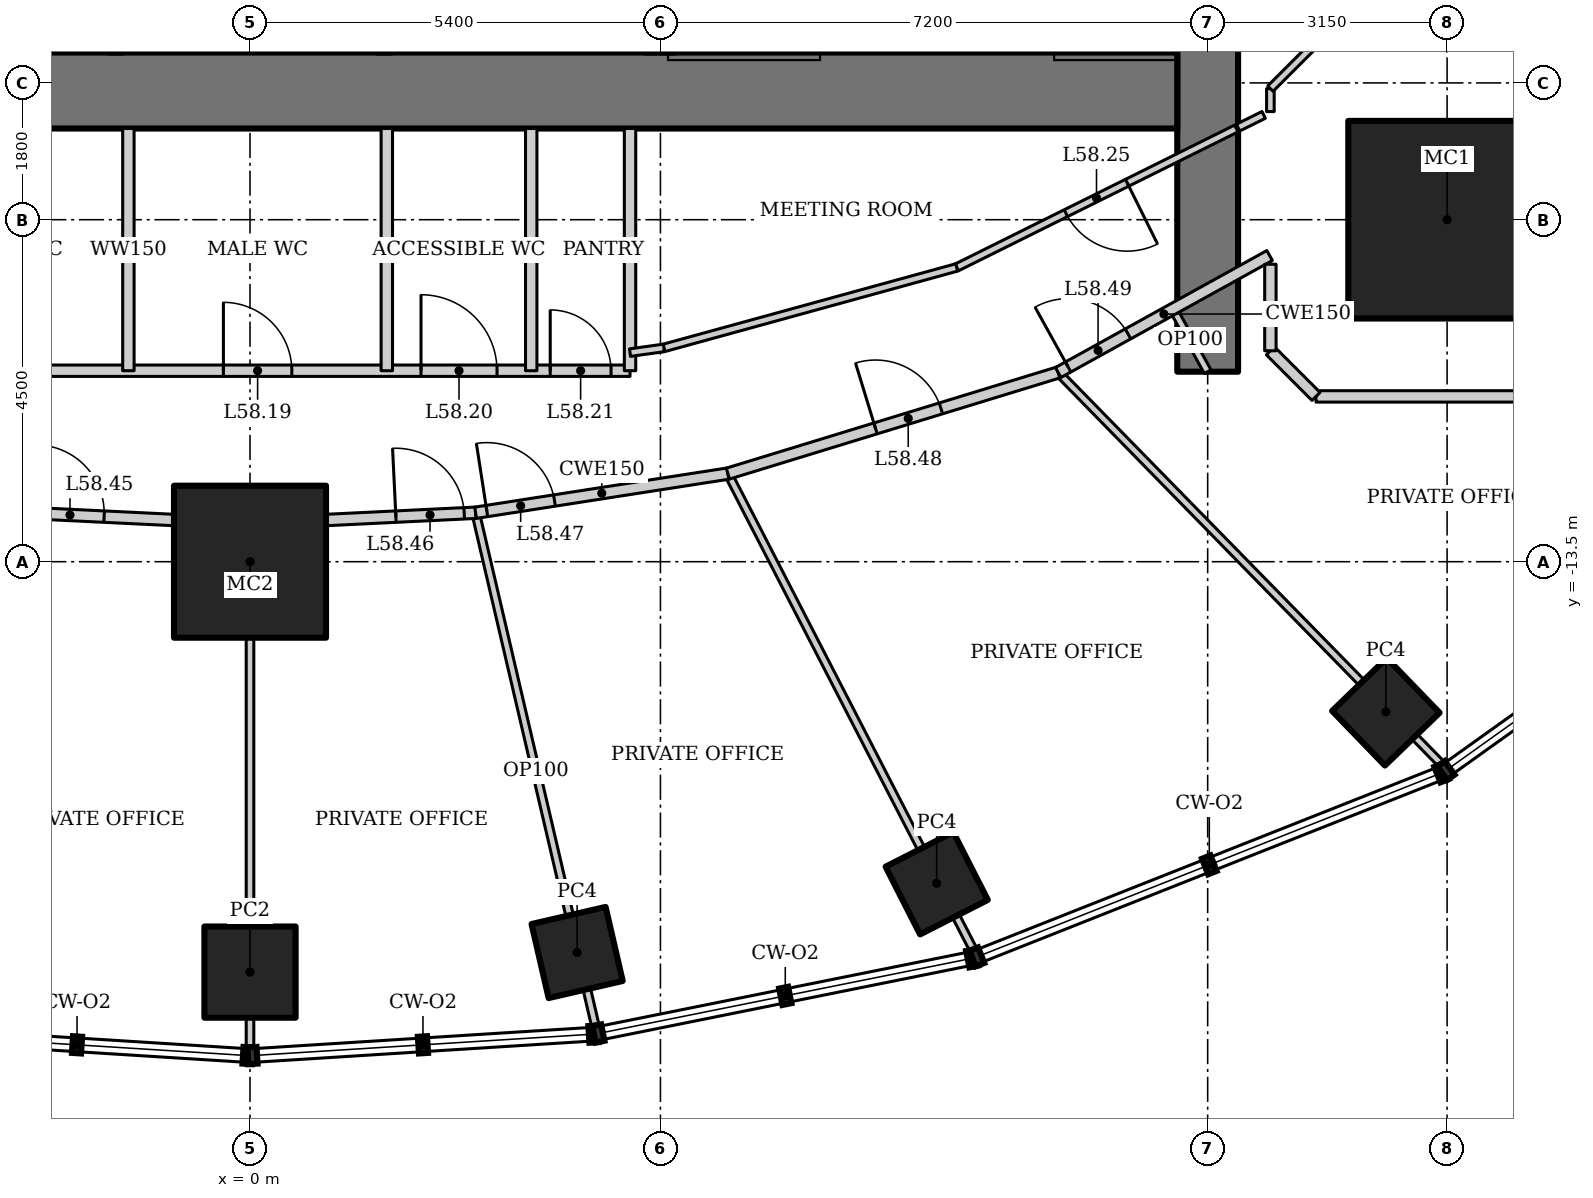
"""IFC4 building model, lengths in metres.
Left out: names, types, materials, properties, quantities, classifications, styles, units other than length and angle.
Written with IfcOpenShell. Run it as: python <this file> out.ifc"""

import sys

from ifc_helpers import new_model, si_unit, direction, frame, frame_2d, origin, origin_2d, place, context, subcontext, project, spatial, rectangle, hollow_rectangle, extrude, element, fill, save


model = new_model("IFC4")
c1 = context("Model", 3, precision=1e-05, world=origin(), true_north=direction((0.0, 1.0)))
c2 = subcontext(c1, "Body", "Model", "MODEL_VIEW")
j1 = project(units=[si_unit("LENGTHUNIT", "METRE"), si_unit("PLANEANGLEUNIT", "RADIAN")], contexts=[c1])
p1 = place(None, origin())
s1 = spatial("IfcSite", under=j1, at=p1, CompositionType="ELEMENT")
p2 = place(p1, origin())
s2 = spatial("IfcBuilding", under=s1, at=p2, CompositionType="ELEMENT")
p3 = place(p2, frame((0.0, 0.0, 249.4)))
s3 = spatial("IfcBuildingStorey", under=s2, at=p3, CompositionType="ELEMENT", Elevation=249.4)
p4 = place(p3, frame((0.0, -13.5, 0.0), z_axis=(0.0, 0.0, 1.0), x_axis=(1.0, 0.0, 0.0)))
e1 = element("IfcColumn", 1, at=p4, inside=s3, PredefinedType="COLUMN", context=c2, shape_type="SweptSolid", body=[
    extrude(hollow_rectangle(XDim=2.0, YDim=2.0, WallThickness=0.17, at=origin_2d()), origin(), (0.0, 0.0, 1.0), 4.2),
])
p5 = place(p3, frame((15.75, -9.0, 0.0), z_axis=(0.0, 0.0, 1.0), x_axis=(1.0, 0.0, 0.0)))
e2 = element("IfcColumn", 2, at=p5, inside=s3, PredefinedType="COLUMN", context=c2, shape_type="SweptSolid", body=[
    extrude(hollow_rectangle(XDim=2.6, YDim=2.6, WallThickness=0.13, at=origin_2d()), origin(), (0.0, 0.0, 1.0), 4.2),
])
p6 = place(p3, frame((0.0, -18.9, 0.0), z_axis=(0.0, 0.0, 1.0), x_axis=(1.0, 0.0, 0.0)))
e3 = element("IfcColumn", 3, at=p6, inside=s3, PredefinedType="COLUMN", context=c2, shape_type="SweptSolid", body=[
    extrude(hollow_rectangle(XDim=1.2, YDim=1.2, WallThickness=0.1, at=origin_2d()), origin(), (0.0, 0.0, 1.0), 4.2),
])
for number, where, z_axis, x_axis in (
    (4, (4.304, -18.642, 0.0), (0.0, 0.0, 1.0), (0.974, 0.225, 0.0)),
    (5, (9.035, -17.731, 0.0), (0.0, 0.0, 1.0), (0.891, 0.454, 0.0)),
    (6, (14.944, -15.475, 0.0), (0.0, 0.0, 1.0), (0.719, 0.695, 0.0)),
):
    element("IfcColumn", number, at=place(p3, frame(where, z_axis=z_axis, x_axis=x_axis)), inside=s3, PredefinedType="COLUMN", context=c2, shape_type="SweptSolid", body=[
        extrude(hollow_rectangle(XDim=1.0, YDim=1.0, WallThickness=0.08, at=origin_2d()), origin(), (0.0, 0.0, 1.0), 4.2),
    ])
p7 = place(p3, frame((12.6, -11.0, 0.0), z_axis=(0.0, 0.0, 1.0), x_axis=(0.0, 1.0, 0.0)))
e7 = element("IfcWall", 7, at=p7, inside=s3, PredefinedType="SHEAR", context=c2, shape_type="SweptSolid", body=[
    extrude(rectangle(XDim=22.0, YDim=0.8, at=frame_2d((11.0, 0.0))), origin(), (0.0, 0.0, 1.0), 4.2),
])
p8 = place(p7, frame((10.1, 0.0, 0.0)))
e8 = element("IfcOpeningElement", 8, at=p8, cuts=e7, PredefinedType="OPENING", context=c2, shape_type="SweptSolid", body=[
    extrude(rectangle(XDim=1.8, YDim=2.1, at=frame_2d((0.9, 1.05))), frame((0.0, 0.41, 0.0), z_axis=(0.0, -1.0, 0.0), x_axis=(1.0, 0.0, 0.0)), (0.0, 0.0, 1.0), 0.82),
])
p9 = place(p3, frame((-12.2, -7.3, 0.0), z_axis=(0.0, 0.0, 1.0), x_axis=(1.0, 0.0, 0.0)))
e9 = element("IfcWall", 9, at=p9, inside=s3, PredefinedType="SHEAR", context=c2, shape_type="SweptSolid", body=[
    extrude(rectangle(XDim=24.4, YDim=1.0, at=frame_2d((12.2, 0.0))), origin(), (0.0, 0.0, 1.0), 4.2),
])
for number, where, z_axis, x_axis in (
    (10, (-1.767, -2.6, 0.0), (0.0, 0.0, 1.0), (0.0, -1.0, 0.0)),
    (11, (1.767, -2.6, 0.0), (0.0, 0.0, 1.0), (0.0, -1.0, 0.0)),
):
    element("IfcWall", number, at=place(p3, frame(where, z_axis=z_axis, x_axis=x_axis)), inside=s3, PredefinedType="SOLIDWALL", context=c2, shape_type="SweptSolid", body=[
        extrude(rectangle(XDim=4.2, YDim=0.2, at=frame_2d((2.1, 0.0))), origin(), (0.0, 0.0, 1.0), 4.2),
    ])
p10 = place(p3, frame((0.0, -19.945, 0.0), z_axis=(0.0, 0.0, 1.0), x_axis=(0.0, 1.0, 0.0)))
e12 = element("IfcWall", 12, at=p10, inside=s3, PredefinedType="PARTITIONING", context=c2, shape_type="SweptSolid", body=[
    extrude(rectangle(XDim=6.945, YDim=0.1, at=frame_2d((3.472, 0.0))), origin(), (0.0, 0.0, 1.0), 3.644),
])
p11 = place(p3, frame((4.556, -19.657, 0.0), z_axis=(0.0, 0.0, 1.0), x_axis=(-0.22733791689, 0.973815933092, 0.0)))
e13 = element("IfcWall", 13, at=p11, inside=s3, PredefinedType="PARTITIONING", context=c2, shape_type="SweptSolid", body=[
    extrude(rectangle(XDim=6.984, YDim=0.1, at=frame_2d((3.492, 0.0))), origin(), (0.0, 0.0, 1.0), 3.293),
])
p12 = place(p3, frame((9.54, -18.65, 0.0), z_axis=(0.0, 0.0, 1.0), x_axis=(-0.45810402165, 0.88889859115, 0.0)))
e14 = element("IfcWall", 14, at=p12, inside=s3, PredefinedType="PARTITIONING", context=c2, shape_type="SweptSolid", body=[
    extrude(rectangle(XDim=7.098, YDim=0.1, at=frame_2d((3.549, 0.0))), origin(), (0.0, 0.0, 1.0), 3.293),
])
p13 = place(p3, frame((15.709, -16.199, 0.0), z_axis=(0.0, 0.0, 1.0), x_axis=(-0.699362525935, 0.714767135029, 0.0)))
e15 = element("IfcWall", 15, at=p13, inside=s3, PredefinedType="PARTITIONING", context=c2, shape_type="SweptSolid", body=[
    extrude(rectangle(XDim=7.259, YDim=0.1, at=frame_2d((3.629, 0.0))), origin(), (0.0, 0.0, 1.0), 3.41),
])
p14 = place(p3, frame((-2.968, -12.856, 0.0), z_axis=(0.0, 0.0, 1.0), x_axis=(0.998824412818, -0.04847465687, 0.0)))
e16 = element("IfcWall", 16, at=p14, inside=s3, PredefinedType="PARTITIONING", context=c2, shape_type="SweptSolid", body=[
    extrude(rectangle(XDim=2.971, YDim=0.15, at=frame_2d((1.486, 0.0))), origin(), (0.0, 0.0, 1.0), 4.05),
])
p15 = place(p14, frame((0.15, 0.0, 0.0)))
e17 = element("IfcOpeningElement", 17, at=p15, cuts=e16, PredefinedType="OPENING", context=c2, shape_type="SweptSolid", body=[
    extrude(rectangle(XDim=0.9, YDim=2.1, at=frame_2d((0.45, 1.05))), frame((0.0, 0.085, 0.0), z_axis=(0.0, -1.0, 0.0), x_axis=(1.0, 0.0, 0.0)), (0.0, 0.0, 1.0), 0.17),
])
p16 = place(p3, frame((0.0, -13.0, 0.0), z_axis=(0.0, 0.0, 1.0), x_axis=(0.998824412818, 0.04847465687, 0.0)))
e18 = element("IfcWall", 18, at=p16, inside=s3, PredefinedType="PARTITIONING", context=c2, shape_type="SweptSolid", body=[
    extrude(rectangle(XDim=2.971, YDim=0.15, at=frame_2d((1.486, 0.0))), origin(), (0.0, 0.0, 1.0), 4.05),
])
p17 = place(p16, frame((1.921, 0.0, 0.0)))
e19 = element("IfcOpeningElement", 19, at=p17, cuts=e18, PredefinedType="OPENING", context=c2, shape_type="SweptSolid", body=[
    extrude(rectangle(XDim=0.9, YDim=2.1, at=frame_2d((0.45, 1.05))), frame((0.0, 0.085, 0.0), z_axis=(0.0, -1.0, 0.0), x_axis=(1.0, 0.0, 0.0)), (0.0, 0.0, 1.0), 0.17),
])
p18 = place(p3, frame((2.968, -12.856, 0.0), z_axis=(0.0, 0.0, 1.0), x_axis=(0.988174283057, 0.153334882869, 0.0)))
e20 = element("IfcWall", 20, at=p18, inside=s3, PredefinedType="PARTITIONING", context=c2, shape_type="SweptSolid", body=[
    extrude(rectangle(XDim=3.36, YDim=0.15, at=frame_2d((1.68, 0.0))), origin(), (0.0, 0.0, 1.0), 4.05),
])
p19 = place(p18, frame((0.15, 0.0, 0.0)))
e21 = element("IfcOpeningElement", 21, at=p19, cuts=e20, PredefinedType="OPENING", context=c2, shape_type="SweptSolid", body=[
    extrude(rectangle(XDim=0.9, YDim=2.1, at=frame_2d((0.45, 1.05))), frame((0.0, 0.085, 0.0), z_axis=(0.0, -1.0, 0.0), x_axis=(1.0, 0.0, 0.0)), (0.0, 0.0, 1.0), 0.17),
])
p20 = place(p3, frame((6.288, -12.341, 0.0), z_axis=(0.0, 0.0, 1.0), x_axis=(0.956185837153, 0.292760388079, 0.0)))
e22 = element("IfcWall", 22, at=p20, inside=s3, PredefinedType="PARTITIONING", context=c2, shape_type="SweptSolid", body=[
    extrude(rectangle(XDim=4.544, YDim=0.15, at=frame_2d((2.272, 0.0))), origin(), (0.0, 0.0, 1.0), 4.05),
])
p21 = place(p20, frame((2.031, 0.0, 0.0)))
e23 = element("IfcOpeningElement", 23, at=p21, cuts=e22, PredefinedType="OPENING", context=c2, shape_type="SweptSolid", body=[
    extrude(rectangle(XDim=0.9, YDim=2.1, at=frame_2d((0.45, 1.05))), frame((0.0, 0.085, 0.0), z_axis=(0.0, -1.0, 0.0), x_axis=(1.0, 0.0, 0.0)), (0.0, 0.0, 1.0), 0.17),
])
p22 = place(p3, frame((-5.0, -10.987, 0.0), z_axis=(0.0, 0.0, 1.0), x_axis=(1.0, 0.0, 0.0)))
e24 = element("IfcWall", 24, at=p22, inside=s3, PredefinedType="SOLIDWALL", context=c2, shape_type="SweptSolid", body=[
    extrude(rectangle(XDim=10.0, YDim=0.15, at=frame_2d((5.0, 0.0))), origin(), (0.0, 0.0, 1.0), 4.05),
])
p23 = place(p22, frame((1.25, 0.0, 0.0)))
e25 = element("IfcOpeningElement", 25, at=p23, cuts=e24, PredefinedType="OPENING", context=c2, shape_type="SweptSolid", body=[
    extrude(rectangle(XDim=0.9, YDim=2.1, at=frame_2d((0.45, 1.05))), frame((0.0, 0.085, 0.0), z_axis=(0.0, -1.0, 0.0), x_axis=(1.0, 0.0, 0.0)), (0.0, 0.0, 1.0), 0.17),
])
p24 = place(p22, frame((4.65, 0.0, 0.0)))
e26 = element("IfcOpeningElement", 26, at=p24, cuts=e24, PredefinedType="OPENING", context=c2, shape_type="SweptSolid", body=[
    extrude(rectangle(XDim=0.9, YDim=2.1, at=frame_2d((0.45, 1.05))), frame((0.0, 0.085, 0.0), z_axis=(0.0, -1.0, 0.0), x_axis=(1.0, 0.0, 0.0)), (0.0, 0.0, 1.0), 0.17),
])
p25 = place(p22, frame((7.25, 0.0, 0.0)))
e27 = element("IfcOpeningElement", 27, at=p25, cuts=e24, PredefinedType="OPENING", context=c2, shape_type="SweptSolid", body=[
    extrude(rectangle(XDim=1.0, YDim=2.1, at=frame_2d((0.5, 1.05))), frame((0.0, 0.085, 0.0), z_axis=(0.0, -1.0, 0.0), x_axis=(1.0, 0.0, 0.0)), (0.0, 0.0, 1.0), 0.17),
])
p26 = place(p22, frame((8.95, 0.0, 0.0)))
e28 = element("IfcOpeningElement", 28, at=p26, cuts=e24, PredefinedType="OPENING", context=c2, shape_type="SweptSolid", body=[
    extrude(rectangle(XDim=0.8, YDim=2.1, at=frame_2d((0.4, 1.05))), frame((0.0, 0.085, 0.0), z_axis=(0.0, -1.0, 0.0), x_axis=(1.0, 0.0, 0.0)), (0.0, 0.0, 1.0), 0.17),
])
for number, where, z_axis, x_axis in (
    (29, (5.0, -7.8, 0.0), (0.0, 0.0, 1.0), (0.0, -1.0, 0.0)),
    (30, (-1.6, -7.8, 0.0), (0.0, 0.0, 1.0), (0.0, -1.0, 0.0)),
):
    element("IfcWall", number, at=place(p3, frame(where, z_axis=z_axis, x_axis=x_axis)), inside=s3, PredefinedType="SOLIDWALL", context=c2, shape_type="SweptSolid", body=[
        extrude(rectangle(XDim=3.187, YDim=0.15, at=frame_2d((1.594, 0.0))), origin(), (0.0, 0.0, 1.0), 4.05),
    ])
p27 = place(p3, frame((1.8, -7.8, 0.0), z_axis=(0.0, 0.0, 1.0), x_axis=(0.0, -1.0, 0.0)))
e31 = element("IfcWall", 31, at=p27, inside=s3, PredefinedType="SOLIDWALL", context=c2, shape_type="SweptSolid", body=[
    extrude(rectangle(XDim=3.187, YDim=0.15, at=frame_2d((1.594, 0.0))), origin(), (0.0, 0.0, 1.0), 3.293),
])
p28 = place(p3, frame((3.7, -7.8, 0.0), z_axis=(0.0, 0.0, 1.0), x_axis=(0.0, -1.0, 0.0)))
e32 = element("IfcWall", 32, at=p28, inside=s3, PredefinedType="SOLIDWALL", context=c2, shape_type="SweptSolid", body=[
    extrude(rectangle(XDim=3.187, YDim=0.15, at=frame_2d((1.594, 0.0))), origin(), (0.0, 0.0, 1.0), 4.05),
])
p29 = place(p3, frame((12.977, -7.8, 0.0), z_axis=(0.0, 0.0, 1.0), x_axis=(-0.895529831139, -0.445001484874, 0.0)))
e33 = element("IfcWall", 33, at=p29, inside=s3, PredefinedType="PARTITIONING", context=c2, shape_type="SweptSolid", body=[
    extrude(rectangle(XDim=4.108, YDim=0.1, at=frame_2d((2.054, 0.0))), origin(), (0.0, 0.0, 1.0), 4.05),
])
p30 = place(p29, frame((1.604, 0.0, 0.0)))
e34 = element("IfcOpeningElement", 34, at=p30, cuts=e33, PredefinedType="OPENING", context=c2, shape_type="SweptSolid", body=[
    extrude(rectangle(XDim=0.9, YDim=2.1, at=frame_2d((0.45, 1.05))), frame((0.0, 0.06, 0.0), z_axis=(0.0, -1.0, 0.0), x_axis=(1.0, 0.0, 0.0)), (0.0, 0.0, 1.0), 0.12),
])
p31 = place(p3, frame((9.298, -9.628, 0.0), z_axis=(0.0, 0.0, 1.0), x_axis=(-0.964244438722, -0.265014456954, 0.0)))
e35 = element("IfcWall", 35, at=p31, inside=s3, PredefinedType="PARTITIONING", context=c2, shape_type="SweptSolid", body=[
    extrude(rectangle(XDim=3.995, YDim=0.1, at=frame_2d((1.998, 0.0))), origin(), (0.0, 0.0, 1.0), 4.05),
])
p32 = place(p3, frame((5.445, -10.687, 0.0), z_axis=(0.0, 0.0, 1.0), x_axis=(-0.990442882696, -0.137923515463, 0.0)))
e36 = element("IfcWall", 36, at=p32, inside=s3, PredefinedType="PARTITIONING", context=c2, shape_type="SweptSolid", body=[
    extrude(rectangle(XDim=0.45, YDim=0.1, at=frame_2d((0.225, 0.0))), origin(), (0.0, 0.0, 1.0), 4.05),
])
p33 = place(p3, frame((13.337, -7.621, 0.0), z_axis=(0.0, 0.0, 1.0), x_axis=(-0.895721570004, -0.444615416995, 0.0)))
e37 = element("IfcWall", 37, at=p33, inside=s3, PredefinedType="PARTITIONING", context=c2, shape_type="SweptSolid", body=[
    extrude(rectangle(XDim=0.376, YDim=0.1, at=frame_2d((0.188, 0.0))), origin(), (0.0, 0.0, 1.0), 4.05),
])
p34 = place(p3, frame((12.6, -11.0, 0.0), z_axis=(0.0, 0.0, 1.0), x_axis=(-0.484103558985, 0.875010710893, 0.0)))
e38 = element("IfcWall", 38, at=p34, inside=s3, PredefinedType="PARTITIONING", context=c2, shape_type="SweptSolid", body=[
    extrude(rectangle(XDim=0.943, YDim=0.1, at=frame_2d((0.472, 0.0))), origin(), (0.0, 0.0, 1.0), 4.05),
])
p35 = place(p3, frame((10.633, -11.01, 0.0), z_axis=(0.0, 0.0, 1.0), x_axis=(0.875072100837, 0.483992580869, 0.0)))
e39 = element("IfcWall", 39, at=p35, inside=s3, PredefinedType="PARTITIONING", context=c2, shape_type="SweptSolid", body=[
    extrude(rectangle(XDim=3.179, YDim=0.15, at=frame_2d((1.59, 0.0))), origin(), (0.0, 0.0, 1.0), 4.05),
])
p36 = place(p35, frame((0.15, 0.0, 0.0)))
e40 = element("IfcOpeningElement", 40, at=p36, cuts=e39, PredefinedType="OPENING", context=c2, shape_type="SweptSolid", body=[
    extrude(rectangle(XDim=0.9, YDim=2.1, at=frame_2d((0.45, 1.05))), frame((0.0, 0.085, 0.0), z_axis=(0.0, -1.0, 0.0), x_axis=(1.0, 0.0, 0.0)), (0.0, 0.0, 1.0), 0.17),
])
p37 = place(p3, frame((13.425, -7.578, 0.0), z_axis=(0.0, 0.0, 1.0), x_axis=(0.0, 1.0, 0.0)))
e41 = element("IfcWall", 41, at=p37, inside=s3, PredefinedType="PARTITIONING", context=c2, shape_type="SweptSolid", body=[
    extrude(rectangle(XDim=0.302, YDim=0.1, at=frame_2d((0.151, 0.0))), origin(), (0.0, 0.0, 1.0), 4.05),
])
p38 = place(p3, frame((13.425, -7.275, 0.0), z_axis=(0.0, 0.0, 1.0), x_axis=(0.707106781187, 0.707106781187, 0.0)))
e42 = element("IfcWall", 42, at=p38, inside=s3, PredefinedType="PARTITIONING", context=c2, shape_type="SweptSolid", body=[
    extrude(rectangle(XDim=0.849, YDim=0.1, at=frame_2d((0.425, 0.0))), origin(), (0.0, 0.0, 1.0), 4.05),
])
p39 = place(p3, frame((17.475, -11.325, 0.0), z_axis=(0.0, 0.0, 1.0), x_axis=(-1.0, 0.0, 0.0)))
e43 = element("IfcWall", 43, at=p39, inside=s3, PredefinedType="PARTITIONING", context=c2, shape_type="SweptSolid", body=[
    extrude(rectangle(XDim=3.449, YDim=0.15, at=frame_2d((1.725, 0.0))), origin(), (0.0, 0.0, 1.0), 4.05),
])
p40 = place(p3, frame((14.025, -11.325, 0.0), z_axis=(0.0, 0.0, 1.0), x_axis=(-0.707106781187, 0.707106781187, 0.0)))
e44 = element("IfcWall", 44, at=p40, inside=s3, PredefinedType="PARTITIONING", context=c2, shape_type="SweptSolid", body=[
    extrude(rectangle(XDim=0.849, YDim=0.15, at=frame_2d((0.425, 0.0))), origin(), (0.0, 0.0, 1.0), 4.05),
])
p41 = place(p3, frame((13.425, -10.725, 0.0), z_axis=(0.0, 0.0, 1.0), x_axis=(0.0, 1.0, 0.0)))
e45 = element("IfcWall", 45, at=p41, inside=s3, PredefinedType="PARTITIONING", context=c2, shape_type="SweptSolid", body=[
    extrude(rectangle(XDim=1.138, YDim=0.15, at=frame_2d((0.569, 0.0))), origin(), (0.0, 0.0, 1.0), 4.05),
])
p42 = place(p24, origin())
e46 = element("IfcDoor", 46, at=p42, inside=s3, OperationType="SINGLE_SWING_LEFT", PredefinedType="DOOR", context=c2, shape_type="SweptSolid", body=[
    extrude(rectangle(XDim=0.9, YDim=2.1, at=frame_2d((0.45, 1.05))), frame((0.0, 0.025, 0.0), z_axis=(0.0, -1.0, 0.0), x_axis=(1.0, 0.0, 0.0)), (0.0, 0.0, 1.0), 0.05),
])
fill(e26, e46)
p43 = place(p25, origin())
e47 = element("IfcDoor", 47, at=p43, inside=s3, OperationType="SINGLE_SWING_LEFT", PredefinedType="DOOR", context=c2, shape_type="SweptSolid", body=[
    extrude(rectangle(XDim=1.0, YDim=2.1, at=frame_2d((0.5, 1.05))), frame((0.0, 0.025, 0.0), z_axis=(0.0, -1.0, 0.0), x_axis=(1.0, 0.0, 0.0)), (0.0, 0.0, 1.0), 0.05),
])
fill(e27, e47)
p44 = place(p26, origin())
e48 = element("IfcDoor", 48, at=p44, inside=s3, OperationType="SINGLE_SWING_LEFT", PredefinedType="DOOR", context=c2, shape_type="SweptSolid", body=[
    extrude(rectangle(XDim=0.8, YDim=2.1, at=frame_2d((0.4, 1.05))), frame((0.0, 0.025, 0.0), z_axis=(0.0, -1.0, 0.0), x_axis=(1.0, 0.0, 0.0)), (0.0, 0.0, 1.0), 0.05),
])
fill(e28, e48)
p45 = place(p30, origin())
e49 = element("IfcDoor", 49, at=p45, inside=s3, OperationType="SINGLE_SWING_LEFT", PredefinedType="DOOR", context=c2, shape_type="SweptSolid", body=[
    extrude(rectangle(XDim=0.9, YDim=2.1, at=frame_2d((0.45, 1.05))), frame((0.0, 0.025, 0.0), z_axis=(0.0, -1.0, 0.0), x_axis=(1.0, 0.0, 0.0)), (0.0, 0.0, 1.0), 0.05),
])
fill(e34, e49)
p46 = place(p15, origin())
e50 = element("IfcDoor", 50, at=p46, inside=s3, OperationType="SINGLE_SWING_LEFT", PredefinedType="DOOR", context=c2, shape_type="SweptSolid", body=[
    extrude(rectangle(XDim=0.9, YDim=2.1, at=frame_2d((0.45, 1.05))), frame((0.0, 0.025, 0.0), z_axis=(0.0, -1.0, 0.0), x_axis=(1.0, 0.0, 0.0)), (0.0, 0.0, 1.0), 0.05),
])
fill(e17, e50)
p47 = place(p17, origin())
e51 = element("IfcDoor", 51, at=p47, inside=s3, OperationType="SINGLE_SWING_LEFT", PredefinedType="DOOR", context=c2, shape_type="SweptSolid", body=[
    extrude(rectangle(XDim=0.9, YDim=2.1, at=frame_2d((0.45, 1.05))), frame((0.0, 0.025, 0.0), z_axis=(0.0, -1.0, 0.0), x_axis=(1.0, 0.0, 0.0)), (0.0, 0.0, 1.0), 0.05),
])
fill(e19, e51)
p48 = place(p19, origin())
e52 = element("IfcDoor", 52, at=p48, inside=s3, OperationType="SINGLE_SWING_LEFT", PredefinedType="DOOR", context=c2, shape_type="SweptSolid", body=[
    extrude(rectangle(XDim=0.9, YDim=2.1, at=frame_2d((0.45, 1.05))), frame((0.0, 0.025, 0.0), z_axis=(0.0, -1.0, 0.0), x_axis=(1.0, 0.0, 0.0)), (0.0, 0.0, 1.0), 0.05),
])
fill(e21, e52)
p49 = place(p21, origin())
e53 = element("IfcDoor", 53, at=p49, inside=s3, OperationType="SINGLE_SWING_LEFT", PredefinedType="DOOR", context=c2, shape_type="SweptSolid", body=[
    extrude(rectangle(XDim=0.9, YDim=2.1, at=frame_2d((0.45, 1.05))), frame((0.0, 0.025, 0.0), z_axis=(0.0, -1.0, 0.0), x_axis=(1.0, 0.0, 0.0)), (0.0, 0.0, 1.0), 0.05),
])
fill(e23, e53)
p50 = place(p36, origin())
e54 = element("IfcDoor", 54, at=p50, inside=s3, OperationType="SINGLE_SWING_LEFT", PredefinedType="DOOR", context=c2, shape_type="SweptSolid", body=[
    extrude(rectangle(XDim=0.9, YDim=2.1, at=frame_2d((0.45, 1.05))), frame((0.0, 0.025, 0.0), z_axis=(0.0, -1.0, 0.0), x_axis=(1.0, 0.0, 0.0)), (0.0, 0.0, 1.0), 0.05),
])
fill(e40, e54)
save(model, sys.argv[1])
